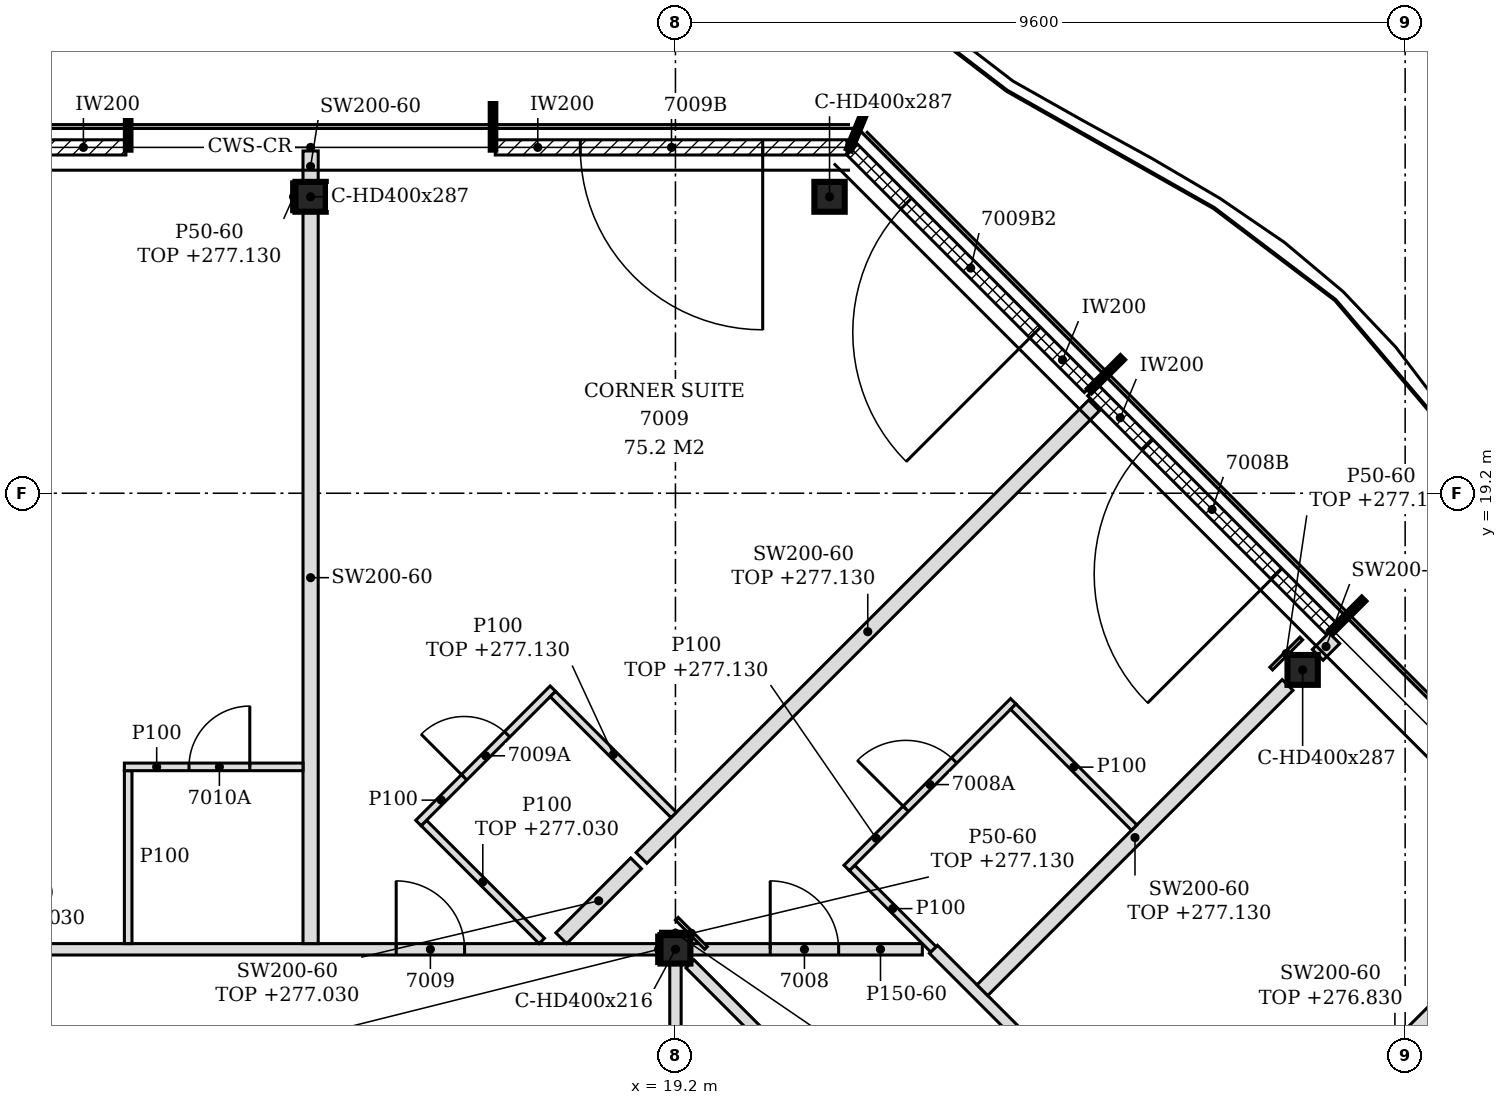
"""IFC4 building model, lengths in metres.
Left out: names, types, materials, properties, quantities, classifications, styles, units other than length and angle.
Written with IfcOpenShell. Run it as: python <this file> out.ifc"""

import sys

from ifc_helpers import new_model, si_unit, direction, frame, frame_2d, origin, origin_2d, place, context, subcontext, project, spatial, polyline, rectangle, i_section, outline, extrude, element, fill, save


model = new_model("IFC4")
c1 = context("Model", 3, precision=1e-05, world=origin(), true_north=direction((0.0, 1.0)))
c2 = subcontext(c1, "Body", "Model", "MODEL_VIEW")
j1 = project(units=[si_unit("LENGTHUNIT", "METRE"), si_unit("PLANEANGLEUNIT", "RADIAN")], contexts=[c1])
p1 = place(None, origin())
s1 = spatial("IfcSite", under=j1, at=p1, CompositionType="ELEMENT")
p2 = place(p1, origin())
s2 = spatial("IfcBuilding", under=s1, at=p2, CompositionType="ELEMENT")
p3 = place(p2, frame((0.0, 0.0, 274.2)))
s3 = spatial("IfcBuildingStorey", under=s2, at=p3, CompositionType="ELEMENT", Elevation=274.2)
for number, where, z_axis, x_axis in (
    (1, (27.451, 16.876, -0.15), (0.0, 0.0, 1.0), (1.0, 0.0, 0.0)),
    (2, (21.227, 23.1, -0.15), (0.0, 0.0, 1.0), (1.0, 0.0, 0.0)),
    (3, (14.4, 23.1, -0.15), (0.0, 0.0, 1.0), (1.0, 0.0, 0.0)),
):
    element("IfcColumn", number, at=place(p3, frame(where, z_axis=z_axis, x_axis=x_axis)), inside=s3, PredefinedType="COLUMN", context=c2, shape_type="SweptSolid", body=[
        extrude(i_section(OverallWidth=0.399, OverallDepth=0.393, WebThickness=0.023, FlangeThickness=0.037, FilletRadius=0.015, at=origin_2d()), origin(), (0.0, 0.0, 1.0), 3.6),
    ])
p4 = place(p3, frame((19.2, 13.2, -0.15), z_axis=(0.0, 0.0, 1.0), x_axis=(1.0, 0.0, 0.0)))
e4 = element("IfcColumn", 4, at=p4, inside=s3, PredefinedType="COLUMN", context=c2, shape_type="SweptSolid", body=[
    extrude(i_section(OverallWidth=0.394, OverallDepth=0.375, WebThickness=0.017, FlangeThickness=0.028, FilletRadius=0.015, at=origin_2d()), origin(), (0.0, 0.0, 1.0), 3.6),
])
p5 = place(p3, frame((27.826, 17.42, 0.0), z_axis=(0.0, 0.0, 1.0), x_axis=(-0.707079231393, 0.707134329907, 0.0)))
e5 = element("IfcWall", 5, at=p5, inside=s3, PredefinedType="NOTDEFINED", context=c2, shape_type="SweptSolid", body=[
    extrude(rectangle(XDim=4.431, YDim=0.2, at=frame_2d((2.215, 0.0))), origin(), (0.0, 0.0, 1.0), 3.45),
])
p6 = place(p5, frame((1.015, 0.0, 0.0)))
e6 = element("IfcOpeningElement", 6, at=p6, cuts=e5, PredefinedType="OPENING", context=c2, shape_type="SweptSolid", body=[
    extrude(rectangle(XDim=2.4, YDim=2.4, at=frame_2d((1.2, 1.2))), frame((0.0, 0.11, 0.0), z_axis=(0.0, -1.0, 0.0), x_axis=(1.0, 0.0, 0.0)), (0.0, 0.0, 1.0), 0.22),
])
p7 = place(p3, frame((24.651, 20.596, 0.0), z_axis=(0.0, 0.0, 1.0), x_axis=(-0.707134392299, 0.707079168996, 0.0)))
e7 = element("IfcWall", 7, at=p7, inside=s3, PredefinedType="NOTDEFINED", context=c2, shape_type="SweptSolid", body=[
    extrude(rectangle(XDim=4.421, YDim=0.2, at=frame_2d((2.21, 0.0))), origin(), (0.0, 0.0, 1.0), 3.45),
])
p8 = place(p7, frame((1.016, 0.0, 0.0)))
e8 = element("IfcOpeningElement", 8, at=p8, cuts=e7, PredefinedType="OPENING", context=c2, shape_type="SweptSolid", body=[
    extrude(rectangle(XDim=2.4, YDim=2.4, at=frame_2d((1.2, 1.2))), frame((0.0, 0.11, 0.0), z_axis=(0.0, -1.0, 0.0), x_axis=(1.0, 0.0, 0.0)), (0.0, 0.0, 1.0), 0.22),
])
p9 = place(p3, frame((21.457, 23.75, 0.0), z_axis=(0.0, 0.0, 1.0), x_axis=(-1.0, 0.0, 0.0)))
e9 = element("IfcWall", 9, at=p9, inside=s3, PredefinedType="NOTDEFINED", context=c2, shape_type="SweptSolid", body=[
    extrude(rectangle(XDim=4.626, YDim=0.2, at=frame_2d((2.313, 0.0))), origin(), (0.0, 0.0, 1.0), 3.45),
])
p10 = place(p9, frame((1.108, 0.0, 0.0)))
e10 = element("IfcOpeningElement", 10, at=p10, cuts=e9, PredefinedType="OPENING", context=c2, shape_type="SweptSolid", body=[
    extrude(rectangle(XDim=2.4, YDim=2.4, at=frame_2d((1.2, 1.2))), frame((0.0, 0.11, 0.0), z_axis=(0.0, -1.0, 0.0), x_axis=(1.0, 0.0, 0.0)), (0.0, 0.0, 1.0), 0.22),
])
p11 = place(p3, frame((11.97, 23.75, 0.0), z_axis=(0.0, 0.0, 1.0), x_axis=(-1.0, 0.0, 0.0)))
e11 = element("IfcWall", 11, at=p11, inside=s3, PredefinedType="NOTDEFINED", context=c2, shape_type="SweptSolid", body=[
    extrude(rectangle(XDim=4.626, YDim=0.2, at=frame_2d((2.313, 0.0))), origin(), (0.0, 0.0, 1.0), 3.45),
])
p12 = place(p11, frame((1.118, 0.0, 0.0)))
e12 = element("IfcOpeningElement", 12, at=p12, cuts=e11, PredefinedType="OPENING", context=c2, shape_type="SweptSolid", body=[
    extrude(rectangle(XDim=2.4, YDim=2.4, at=frame_2d((1.2, 1.2))), frame((0.0, 0.11, 0.0), z_axis=(0.0, -1.0, 0.0), x_axis=(1.0, 0.0, 0.0)), (0.0, 0.0, 1.0), 0.22),
])
p13 = place(p3, frame((29.947, 2.453, 0.0), z_axis=(0.0, 0.0, 1.0), x_axis=(-0.707098603185, 0.707114959093, 0.0)))
e13 = element("IfcWall", 13, at=p13, inside=s3, PredefinedType="PARTITIONING", context=c2, shape_type="SweptSolid", body=[
    extrude(rectangle(XDim=14.927, YDim=0.15, at=frame_2d((7.463, 0.0))), origin(), (0.0, 0.0, 1.0), 2.88),
])
p14 = place(p13, frame((1.325, 0.0, 0.0)))
e14 = element("IfcOpeningElement", 14, at=p14, cuts=e13, PredefinedType="OPENING", context=c2, shape_type="SweptSolid", body=[
    extrude(rectangle(XDim=0.8, YDim=2.1, at=frame_2d((0.4, 1.05))), frame((0.0, 0.085, 0.0), z_axis=(0.0, -1.0, 0.0), x_axis=(1.0, 0.0, 0.0)), (0.0, 0.0, 1.0), 0.17),
])
p15 = place(p3, frame((19.2, 2.587, 0.0), z_axis=(0.0, 0.0, 1.0), x_axis=(0.0, 1.0, 0.0)))
e15 = element("IfcWall", 15, at=p15, inside=s3, PredefinedType="PARTITIONING", context=c2, shape_type="SweptSolid", body=[
    extrude(rectangle(XDim=10.425, YDim=0.15, at=frame_2d((5.212, 0.0))), origin(), (0.0, 0.0, 1.0), 2.83),
])
p16 = place(p15, frame((4.312, 0.0, 0.0)))
e16 = element("IfcOpeningElement", 16, at=p16, cuts=e15, PredefinedType="OPENING", context=c2, shape_type="SweptSolid", body=[
    extrude(rectangle(XDim=0.9, YDim=2.1, at=frame_2d((0.45, 1.05))), frame((0.0, 0.085, 0.0), z_axis=(0.0, -1.0, 0.0), x_axis=(1.0, 0.0, 0.0)), (0.0, 0.0, 1.0), 0.17),
])
p17 = place(p3, frame((32.272, 3.522, 0.0), z_axis=(0.0, 0.0, 1.0), x_axis=(-0.707106781187, 0.707106781187, 0.0)))
e17 = element("IfcWall", 17, at=p17, inside=s3, PredefinedType="PARTITIONING", context=c2, shape_type="SweptSolid", body=[
    extrude(rectangle(XDim=13.687, YDim=0.15, at=frame_2d((6.843, 0.0))), origin(), (0.0, 0.0, 1.0), 2.88),
])
p18 = place(p17, frame((1.988, 0.0, 0.0)))
e18 = element("IfcOpeningElement", 18, at=p18, cuts=e17, PredefinedType="OPENING", context=c2, shape_type="SweptSolid", body=[
    extrude(rectangle(XDim=0.9, YDim=2.1, at=frame_2d((0.45, 1.05))), frame((0.0, 0.085, 0.0), z_axis=(0.0, -1.0, 0.0), x_axis=(1.0, 0.0, 0.0)), (0.0, 0.0, 1.0), 0.17),
])
p19 = place(p17, frame((6.303, 0.0, 0.0)))
e19 = element("IfcOpeningElement", 19, at=p19, cuts=e17, PredefinedType="OPENING", context=c2, shape_type="SweptSolid", body=[
    extrude(rectangle(XDim=0.9, YDim=2.1, at=frame_2d((0.45, 1.05))), frame((0.0, 0.085, 0.0), z_axis=(0.0, -1.0, 0.0), x_axis=(1.0, 0.0, 0.0)), (0.0, 0.0, 1.0), 0.17),
])
p20 = place(p17, frame((10.2, 0.0, 0.0)))
e20 = element("IfcOpeningElement", 20, at=p20, cuts=e17, PredefinedType="OPENING", context=c2, shape_type="SweptSolid", body=[
    extrude(rectangle(XDim=0.9, YDim=2.1, at=frame_2d((0.45, 1.05))), frame((0.0, 0.085, 0.0), z_axis=(0.0, -1.0, 0.0), x_axis=(1.0, 0.0, 0.0)), (0.0, 0.0, 1.0), 0.17),
])
p21 = place(p3, frame((26.35, 9.55, 0.0), z_axis=(0.0, 0.0, 1.0), x_axis=(0.707088140984, 0.707125420898, 0.0)))
e21 = element("IfcWall", 21, at=p21, inside=s3, PredefinedType="PARTITIONING", context=c2, shape_type="SweptSolid", body=[
    extrude(rectangle(XDim=6.549, YDim=0.2, at=frame_2d((3.274, 0.0))), origin(), (0.0, 0.0, 1.0), 2.63),
])
p22 = place(p3, frame((23.238, 12.662, 0.0), z_axis=(0.0, 0.0, 1.0), x_axis=(0.707128276734, 0.707085284986, 0.0)))
e22 = element("IfcWall", 22, at=p22, inside=s3, PredefinedType="PARTITIONING", context=c2, shape_type="SweptSolid", body=[
    extrude(rectangle(XDim=5.679, YDim=0.2, at=frame_2d((2.839, 0.0))), origin(), (0.0, 0.0, 1.0), 2.93),
])
p23 = place(p3, frame((7.397, 13.2, 0.0), z_axis=(0.0, 0.0, 1.0), x_axis=(1.0, 0.0, 0.0)))
e23 = element("IfcWall", 23, at=p23, inside=s3, PredefinedType="PARTITIONING", context=c2, shape_type="SweptSolid", body=[
    extrude(rectangle(XDim=11.606, YDim=0.15, at=frame_2d((5.803, 0.0))), origin(), (0.0, 0.0, 1.0), 2.83),
])
p24 = place(p23, frame((8.129, 0.0, 0.0)))
e24 = element("IfcOpeningElement", 24, at=p24, cuts=e23, PredefinedType="OPENING", context=c2, shape_type="SweptSolid", body=[
    extrude(rectangle(XDim=0.9, YDim=2.1, at=frame_2d((0.45, 1.05))), frame((0.0, 0.085, 0.0), z_axis=(0.0, -1.0, 0.0), x_axis=(1.0, 0.0, 0.0)), (0.0, 0.0, 1.0), 0.17),
])
p25 = place(p3, frame((19.397, 13.2, 0.0), z_axis=(0.0, 0.0, 1.0), x_axis=(1.0, 0.0, 0.0)))
e25 = element("IfcWall", 25, at=p25, inside=s3, PredefinedType="PARTITIONING", context=c2, shape_type="SweptSolid", body=[
    extrude(rectangle(XDim=3.051, YDim=0.15, at=frame_2d((1.526, 0.0))), origin(), (0.0, 0.0, 1.0), 3.45),
])
p26 = place(p25, frame((1.05, 0.0, 0.0)))
e26 = element("IfcOpeningElement", 26, at=p26, cuts=e25, PredefinedType="OPENING", context=c2, shape_type="SweptSolid", body=[
    extrude(rectangle(XDim=0.9, YDim=2.1, at=frame_2d((0.45, 1.05))), frame((0.0, 0.085, 0.0), z_axis=(0.0, -1.0, 0.0), x_axis=(1.0, 0.0, 0.0)), (0.0, 0.0, 1.0), 0.17),
])
p27 = place(p3, frame((22.594, 13.2, 0.0), z_axis=(0.0, 0.0, 1.0), x_axis=(-0.707106781187, 0.707106781187, 0.0)))
e27 = element("IfcWall", 27, at=p27, inside=s3, PredefinedType="PARTITIONING", context=c2, shape_type="SweptSolid", body=[
    extrude(rectangle(XDim=1.514, YDim=0.1, at=frame_2d((0.757, 0.0))), origin(), (0.0, 0.0, 1.0), 3.45),
])
p28 = place(p3, frame((12.0, 13.275, 0.0), z_axis=(0.0, 0.0, 1.0), x_axis=(0.0, 1.0, 0.0)))
e28 = element("IfcWall", 28, at=p28, inside=s3, PredefinedType="PARTITIONING", context=c2, shape_type="SweptSolid", body=[
    extrude(outline(polyline([(0.0, 0.0), (2.275, 0.0), (2.275, 3.45), (0.075, 3.45), (0.073, 2.83), (0.0, 2.83), (0.0, 0.0)])), frame((0.0, 0.05, 0.0), z_axis=(0.0, -1.0, 0.0), x_axis=(1.0, 0.0, 0.0)), (0.0, 0.0, 1.0), 0.1),
])
p29 = place(p3, frame((14.4, 13.275, 0.0), z_axis=(0.0, 0.0, 1.0), x_axis=(0.0, 1.0, 0.0)))
e29 = element("IfcWall", 29, at=p29, inside=s3, PredefinedType="PARTITIONING", context=c2, shape_type="SweptSolid", body=[
    extrude(outline(polyline([(0.0, 0.0), (9.629, 0.0), (9.628, 3.45), (6.03, 3.45), (6.028, 2.88), (5.82, 2.88), (5.818, 3.45), (0.075, 3.45), (0.073, 2.83), (0.0, 2.83), (0.0, 0.0)])), frame((0.0, 0.1, 0.0), z_axis=(0.0, -1.0, 0.0), x_axis=(1.0, 0.0, 0.0)), (0.0, 0.0, 1.0), 0.2),
])
p30 = place(p3, frame((17.442, 13.31, 0.0), z_axis=(0.0, 0.0, 1.0), x_axis=(-0.707273623788, 0.706939899209, 0.0)))
e30 = element("IfcWall", 30, at=p30, inside=s3, PredefinedType="PARTITIONING", context=c2, shape_type="SweptSolid", body=[
    extrude(rectangle(XDim=2.195, YDim=0.1, at=frame_2d((1.097, 0.0))), origin(), (0.0, 0.0, 1.0), 2.83),
])
p31 = place(p3, frame((17.698, 13.346, 0.0), z_axis=(0.0, 0.0, 1.0), x_axis=(0.707019164958, 0.70719438656, 0.0)))
e31 = element("IfcWall", 31, at=p31, inside=s3, PredefinedType="PARTITIONING", context=c2, shape_type="SweptSolid", body=[
    extrude(rectangle(XDim=1.393, YDim=0.2, at=frame_2d((0.697, 0.0))), origin(), (0.0, 0.0, 1.0), 2.83),
])
p32 = place(p3, frame((21.453, 14.271, 0.0), z_axis=(0.0, 0.0, 1.0), x_axis=(0.70690988682, 0.707303620743, 0.0)))
e32 = element("IfcWall", 32, at=p32, inside=s3, PredefinedType="PARTITIONING", context=c2, shape_type="SweptSolid", body=[
    extrude(rectangle(XDim=3.1, YDim=0.1, at=frame_2d((1.55, 0.0))), origin(), (0.0, 0.0, 1.0), 2.93),
])
p33 = place(p32, frame((1.1, 0.0, 0.0)))
e33 = element("IfcOpeningElement", 33, at=p33, cuts=e32, PredefinedType="OPENING", context=c2, shape_type="SweptSolid", body=[
    extrude(rectangle(XDim=0.9, YDim=2.1, at=frame_2d((0.45, 1.05))), frame((0.0, 0.06, 0.0), z_axis=(0.0, -1.0, 0.0), x_axis=(1.0, 0.0, 0.0)), (0.0, 0.0, 1.0), 0.12),
])
p34 = place(p3, frame((18.753, 14.402, 0.0), z_axis=(0.0, 0.0, 1.0), x_axis=(0.707179267043, 0.707034287899, 0.0)))
e34 = element("IfcWall", 34, at=p34, inside=s3, PredefinedType="PARTITIONING", context=c2, shape_type="SweptSolid", body=[
    extrude(rectangle(XDim=8.42, YDim=0.2, at=frame_2d((4.21, 0.0))), origin(), (0.0, 0.0, 1.0), 2.93),
])
p35 = place(p3, frame((25.235, 14.801, 0.0), z_axis=(0.0, 0.0, 1.0), x_axis=(-0.706944047094, 0.707269477836, 0.0)))
e35 = element("IfcWall", 35, at=p35, inside=s3, PredefinedType="PARTITIONING", context=c2, shape_type="SweptSolid", body=[
    extrude(rectangle(XDim=2.251, YDim=0.1, at=frame_2d((1.125, 0.0))), origin(), (0.0, 0.0, 1.0), 3.45),
])
p36 = place(p3, frame((15.819, 14.862, 0.0), z_axis=(0.0, 0.0, 1.0), x_axis=(0.707350821469, 0.706862656651, 0.0)))
e36 = element("IfcWall", 36, at=p36, inside=s3, PredefinedType="PARTITIONING", context=c2, shape_type="SweptSolid", body=[
    extrude(rectangle(XDim=2.5, YDim=0.1, at=frame_2d((1.25, 0.0))), origin(), (0.0, 0.0, 1.0), 3.45),
])
p37 = place(p36, frame((0.851, 0.0, 0.0)))
e37 = element("IfcOpeningElement", 37, at=p37, cuts=e36, PredefinedType="OPENING", context=c2, shape_type="SweptSolid", body=[
    extrude(rectangle(XDim=0.8, YDim=2.1, at=frame_2d((0.4, 1.05))), frame((0.0, 0.06, 0.0), z_axis=(0.0, -1.0, 0.0), x_axis=(1.0, 0.0, 0.0)), (0.0, 0.0, 1.0), 0.12),
])
p38 = place(p3, frame((19.177, 14.968, 0.0), z_axis=(0.0, 0.0, 1.0), x_axis=(-0.706889644159, 0.707323851557, 0.0)))
e38 = element("IfcWall", 38, at=p38, inside=s3, PredefinedType="PARTITIONING", context=c2, shape_type="SweptSolid", body=[
    extrude(rectangle(XDim=2.249, YDim=0.1, at=frame_2d((1.125, 0.0))), origin(), (0.0, 0.0, 1.0), 2.93),
])
p39 = place(p3, frame((11.95, 15.6, 0.0), z_axis=(0.0, 0.0, 1.0), x_axis=(1.0, 0.0, 0.0)))
e39 = element("IfcWall", 39, at=p39, inside=s3, PredefinedType="PARTITIONING", context=c2, shape_type="SweptSolid", body=[
    extrude(rectangle(XDim=2.35, YDim=0.1, at=frame_2d((1.175, 0.0))), origin(), (0.0, 0.0, 1.0), 3.45),
])
p40 = place(p39, frame((0.85, 0.0, 0.0)))
e40 = element("IfcOpeningElement", 40, at=p40, cuts=e39, PredefinedType="OPENING", context=c2, shape_type="SweptSolid", body=[
    extrude(rectangle(XDim=0.8, YDim=2.1, at=frame_2d((0.4, 1.05))), frame((0.0, 0.06, 0.0), z_axis=(0.0, -1.0, 0.0), x_axis=(1.0, 0.0, 0.0)), (0.0, 0.0, 1.0), 0.12),
])
p41 = place(p3, frame((27.65, 17.073, 0.0), z_axis=(0.0, 0.0, 1.0), x_axis=(0.707106781187, 0.707106781187, 0.0)))
e41 = element("IfcWall", 41, at=p41, inside=s3, PredefinedType="PARTITIONING", context=c2, shape_type="SweptSolid", body=[
    extrude(rectangle(XDim=0.31, YDim=0.2, at=frame_2d((0.155, 0.0))), origin(), (0.0, 0.0, 1.0), 3.45),
])
p42 = place(p3, frame((14.4, 23.296, 0.0), z_axis=(0.0, 0.0, 1.0), x_axis=(0.0, 1.0, 0.0)))
e42 = element("IfcWall", 42, at=p42, inside=s3, PredefinedType="PARTITIONING", context=c2, shape_type="SweptSolid", body=[
    extrude(rectangle(XDim=0.406, YDim=0.2, at=frame_2d((0.203, 0.0))), origin(), (0.0, 0.0, 1.0), 3.45),
])
p43 = place(p3, frame((18.978, 13.012, 0.0), z_axis=(0.0, 0.0, 1.0), x_axis=(0.0, 1.0, 0.0)))
e43 = element("IfcWall", 43, at=p43, inside=s3, PredefinedType="PARTITIONING", context=c2, shape_type="SweptSolid", body=[
    extrude(rectangle(XDim=0.375, YDim=0.05, at=frame_2d((0.188, 0.0))), origin(), (0.0, 0.0, 1.0), 2.83),
])
p44 = place(p3, frame((19.602, 13.218, 0.0), z_axis=(0.0, 0.0, 1.0), x_axis=(-0.707106781187, 0.707106781187, 0.0)))
e44 = element("IfcWall", 44, at=p44, inside=s3, PredefinedType="PARTITIONING", context=c2, shape_type="SweptSolid", body=[
    extrude(rectangle(XDim=0.544, YDim=0.05, at=frame_2d((0.272, 0.0))), origin(), (0.0, 0.0, 1.0), 2.93),
])
p45 = place(p3, frame((27.038, 16.893, 0.0), z_axis=(0.0, 0.0, 1.0), x_axis=(0.707106781187, 0.707106781187, 0.0)))
e45 = element("IfcWall", 45, at=p45, inside=s3, PredefinedType="PARTITIONING", context=c2, shape_type="SweptSolid", body=[
    extrude(rectangle(XDim=0.56, YDim=0.05, at=frame_2d((0.28, 0.0))), origin(), (0.0, 0.0, 1.0), 2.93),
])
p46 = place(p3, frame((19.003, 13.413, 0.0), z_axis=(0.0, 0.0, 1.0), x_axis=(1.0, 0.0, 0.0)))
e46 = element("IfcWall", 46, at=p46, inside=s3, PredefinedType="PARTITIONING", context=c2, shape_type="SweptSolid", body=[
    extrude(rectangle(XDim=0.394, YDim=0.05, at=frame_2d((0.197, 0.0))), origin(), (0.0, 0.0, 1.0), 2.93),
])
p47 = place(p3, frame((14.176, 22.904, 0.0), z_axis=(0.0, 0.0, 1.0), x_axis=(0.0, 1.0, 0.0)))
e47 = element("IfcWall", 47, at=p47, inside=s3, PredefinedType="PARTITIONING", context=c2, shape_type="SweptSolid", body=[
    extrude(rectangle(XDim=0.393, YDim=0.05, at=frame_2d((0.196, 0.0))), origin(), (0.0, 0.0, 1.0), 2.93),
])
p48 = place(p6, origin())
e48 = element("IfcDoor", 48, at=p48, inside=s3, OperationType="SINGLE_SWING_LEFT", PredefinedType="DOOR", context=c2, shape_type="SweptSolid", body=[
    extrude(rectangle(XDim=2.4, YDim=2.4, at=frame_2d((1.2, 1.2))), frame((0.0, 0.025, 0.0), z_axis=(0.0, -1.0, 0.0), x_axis=(1.0, 0.0, 0.0)), (0.0, 0.0, 1.0), 0.05),
])
fill(e6, e48)
p49 = place(p8, origin())
e49 = element("IfcDoor", 49, at=p49, inside=s3, OperationType="SINGLE_SWING_LEFT", PredefinedType="DOOR", context=c2, shape_type="SweptSolid", body=[
    extrude(rectangle(XDim=2.4, YDim=2.4, at=frame_2d((1.2, 1.2))), frame((0.0, 0.025, 0.0), z_axis=(0.0, -1.0, 0.0), x_axis=(1.0, 0.0, 0.0)), (0.0, 0.0, 1.0), 0.05),
])
fill(e8, e49)
p50 = place(p10, origin())
e50 = element("IfcDoor", 50, at=p50, inside=s3, OperationType="SINGLE_SWING_LEFT", PredefinedType="DOOR", context=c2, shape_type="SweptSolid", body=[
    extrude(rectangle(XDim=2.4, YDim=2.4, at=frame_2d((1.2, 1.2))), frame((0.0, 0.025, 0.0), z_axis=(0.0, -1.0, 0.0), x_axis=(1.0, 0.0, 0.0)), (0.0, 0.0, 1.0), 0.05),
])
fill(e10, e50)
p51 = place(p26, origin())
e51 = element("IfcDoor", 51, at=p51, inside=s3, OperationType="SINGLE_SWING_LEFT", PredefinedType="DOOR", context=c2, shape_type="SweptSolid", body=[
    extrude(rectangle(XDim=0.9, YDim=2.1, at=frame_2d((0.45, 1.05))), frame((0.0, 0.025, 0.0), z_axis=(0.0, -1.0, 0.0), x_axis=(1.0, 0.0, 0.0)), (0.0, 0.0, 1.0), 0.05),
])
fill(e26, e51)
p52 = place(p33, origin())
e52 = element("IfcDoor", 52, at=p52, inside=s3, OperationType="SINGLE_SWING_LEFT", PredefinedType="DOOR", context=c2, shape_type="SweptSolid", body=[
    extrude(rectangle(XDim=0.9, YDim=2.1, at=frame_2d((0.45, 1.05))), frame((0.0, 0.025, 0.0), z_axis=(0.0, -1.0, 0.0), x_axis=(1.0, 0.0, 0.0)), (0.0, 0.0, 1.0), 0.05),
])
fill(e33, e52)
p53 = place(p24, origin())
e53 = element("IfcDoor", 53, at=p53, inside=s3, OperationType="SINGLE_SWING_LEFT", PredefinedType="DOOR", context=c2, shape_type="SweptSolid", body=[
    extrude(rectangle(XDim=0.9, YDim=2.1, at=frame_2d((0.45, 1.05))), frame((0.0, 0.025, 0.0), z_axis=(0.0, -1.0, 0.0), x_axis=(1.0, 0.0, 0.0)), (0.0, 0.0, 1.0), 0.05),
])
fill(e24, e53)
p54 = place(p37, origin())
e54 = element("IfcDoor", 54, at=p54, inside=s3, OperationType="SINGLE_SWING_LEFT", PredefinedType="DOOR", context=c2, shape_type="SweptSolid", body=[
    extrude(rectangle(XDim=0.8, YDim=2.1, at=frame_2d((0.4, 1.05))), frame((0.0, 0.025, 0.0), z_axis=(0.0, -1.0, 0.0), x_axis=(1.0, 0.0, 0.0)), (0.0, 0.0, 1.0), 0.05),
])
fill(e37, e54)
p55 = place(p40, origin())
e55 = element("IfcDoor", 55, at=p55, inside=s3, OperationType="SINGLE_SWING_RIGHT", PredefinedType="DOOR", context=c2, shape_type="SweptSolid", body=[
    extrude(rectangle(XDim=0.8, YDim=2.1, at=frame_2d((0.4, 1.05))), frame((0.0, 0.025, 0.0), z_axis=(0.0, -1.0, 0.0), x_axis=(1.0, 0.0, 0.0)), (0.0, 0.0, 1.0), 0.05),
])
fill(e40, e55)
save(model, sys.argv[1])
